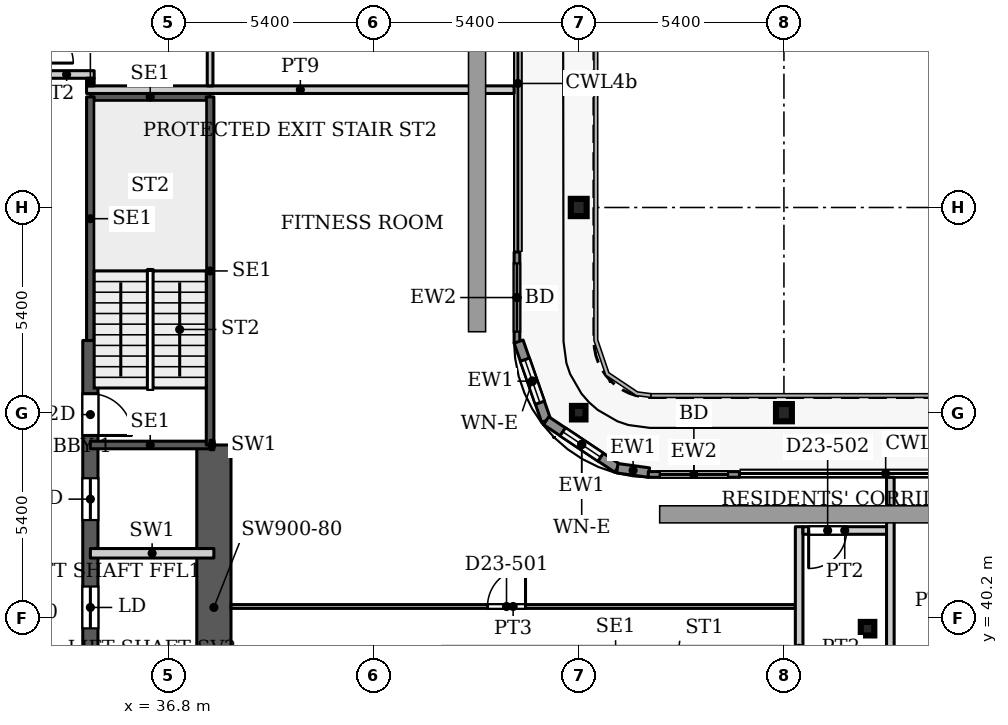
"""IFC4 building model, lengths in metres.
Left out: names, types, materials, properties, quantities, classifications, styles, units other than length and angle.
Written with IfcOpenShell. Run it as: python <this file> out.ifc"""

import sys

from ifc_helpers import new_model, si_unit, direction, frame, frame_2d, origin, origin_2d, place, context, subcontext, project, spatial, rectangle, hollow_rectangle, i_section, extrude, source, transform, mapped, element, fill, save


model = new_model("IFC4")
c1 = context("Model", 3, precision=1e-05, world=origin(), true_north=direction((0.0, 1.0)))
c2 = subcontext(c1, "Body", "Model", "MODEL_VIEW")
j1 = project(units=[si_unit("LENGTHUNIT", "METRE"), si_unit("PLANEANGLEUNIT", "RADIAN")], contexts=[c1])
p1 = place(None, origin())
s1 = spatial("IfcSite", under=j1, at=p1, CompositionType="ELEMENT")
p2 = place(p1, origin())
s2 = spatial("IfcBuilding", under=s1, at=p2, CompositionType="ELEMENT")
p3 = place(p2, frame((0.0, 0.0, 105.8)))
s3 = spatial("IfcBuildingStorey", under=s2, at=p3, CompositionType="ELEMENT", Elevation=105.8)
for number, where, z_axis, x_axis in (
    (1, (53.0, 45.6, 0.0), (0.0, 0.0, 1.0), (1.0, 0.0, 0.0)),
    (2, (47.6, 51.0, 0.0), (0.0, 0.0, 1.0), (1.0, 0.0, 0.0)),
):
    element("IfcColumn", number, at=place(p3, frame(where, z_axis=z_axis, x_axis=x_axis)), inside=s3, PredefinedType="COLUMN", context=c2, shape_type="SweptSolid", body=[
        extrude(i_section(OverallWidth=0.418, OverallDepth=0.455, WebThickness=0.042, FlangeThickness=0.068, FilletRadius=0.014, at=origin_2d()), origin(), (0.0, 0.0, 1.0), 3.9),
    ])
for number, where, z_axis, x_axis in (
    (3, (55.2, 39.916, 0.0), (0.0, 0.0, 1.0), (1.0, 0.0, 0.0)),
    (4, (47.6, 45.6, 0.0), (0.0, 0.0, 1.0), (1.0, 0.0, 0.0)),
):
    element("IfcColumn", number, at=place(p3, frame(where, z_axis=z_axis, x_axis=x_axis)), inside=s3, PredefinedType="COLUMN", context=c2, shape_type="SweptSolid", body=[
        extrude(hollow_rectangle(XDim=0.356, YDim=0.356, WallThickness=0.016, InnerFilletRadius=0.016, OuterFilletRadius=0.032, at=origin_2d()), origin(), (0.0, 0.0, 1.0), 3.9),
    ])
p4 = place(p3, frame((34.75, 29.05, 0.0), z_axis=(0.0, 0.0, 1.0), x_axis=(0.0, 1.0, 0.0)))
e5 = element("IfcWall", 5, at=p4, inside=s3, PredefinedType="SHEAR", context=c2, shape_type="SweptSolid", body=[
    extrude(rectangle(XDim=18.45, YDim=0.4, at=frame_2d((9.225, 0.0))), origin(), (0.0, 0.0, 1.0), 3.9),
])
p5 = place(p4, frame((8.025, 0.0, 0.0)))
e6 = element("IfcOpeningElement", 6, at=p5, cuts=e5, PredefinedType="OPENING", context=c2, shape_type="SweptSolid", body=[
    extrude(rectangle(XDim=1.1, YDim=2.2, at=frame_2d((0.55, 1.1))), frame((0.0, 0.21, 0.0), z_axis=(0.0, -1.0, 0.0), x_axis=(1.0, 0.0, 0.0)), (0.0, 0.0, 1.0), 0.42),
])
p6 = place(p4, frame((10.875, 0.0, 0.0)))
e7 = element("IfcOpeningElement", 7, at=p6, cuts=e5, PredefinedType="OPENING", context=c2, shape_type="SweptSolid", body=[
    extrude(rectangle(XDim=1.1, YDim=2.2, at=frame_2d((0.55, 1.1))), frame((0.0, 0.21, 0.0), z_axis=(0.0, -1.0, 0.0), x_axis=(1.0, 0.0, 0.0)), (0.0, 0.0, 1.0), 0.42),
])
p7 = place(p4, frame((13.725, 0.0, 0.0)))
e8 = element("IfcOpeningElement", 8, at=p7, cuts=e5, PredefinedType="OPENING", context=c2, shape_type="SweptSolid", body=[
    extrude(rectangle(XDim=1.1, YDim=2.2, at=frame_2d((0.55, 1.1))), frame((0.0, 0.21, 0.0), z_axis=(0.0, -1.0, 0.0), x_axis=(1.0, 0.0, 0.0)), (0.0, 0.0, 1.0), 0.42),
])
p8 = place(p4, frame((15.95, 0.0, 0.0)))
e9 = element("IfcOpeningElement", 9, at=p8, cuts=e5, PredefinedType="OPENING", context=c2, shape_type="SweptSolid", body=[
    extrude(rectangle(XDim=1.1, YDim=2.2, at=frame_2d((0.55, 1.1))), frame((0.0, 0.21, 0.0), z_axis=(0.0, -1.0, 0.0), x_axis=(1.0, 0.0, 0.0)), (0.0, 0.0, 1.0), 0.42),
])
p9 = place(p3, frame((38.0, 36.2, 0.0), z_axis=(0.0, 0.0, 1.0), x_axis=(0.0, 1.0, 0.0)))
e10 = element("IfcWall", 10, at=p9, inside=s3, PredefinedType="SHEAR", context=c2, shape_type="SweptSolid", body=[
    extrude(rectangle(XDim=8.55, YDim=0.9, at=frame_2d((4.275, 0.0))), origin(), (0.0, 0.0, 1.0), 3.9),
])
p10 = place(p3, frame((45.975, 49.83, 0.0), z_axis=(0.0, 0.0, 1.0), x_axis=(0.0, -1.0, 0.0)))
e11 = element("IfcWall", 11, at=p10, inside=s3, PredefinedType="SOLIDWALL", context=c2, shape_type="SweptSolid", body=[
    extrude(rectangle(XDim=2.4, YDim=0.15, at=frame_2d((1.2, 0.0))), origin(), (0.0, 0.0, 1.0), 3.75),
])
p11 = place(p10, frame((0.3, 0.0, 0.0)))
e12 = element("IfcOpeningElement", 12, at=p11, cuts=e11, PredefinedType="OPENING", context=c2, shape_type="SweptSolid", body=[
    extrude(rectangle(XDim=1.8, YDim=2.4, at=frame_2d((0.9, 1.2))), frame((0.0, 0.085, 0.0), z_axis=(0.0, -1.0, 0.0), x_axis=(1.0, 0.0, 0.0)), (0.0, 0.0, 1.0), 0.17),
])
p12 = place(p3, frame((46.018, 47.471, 0.0), z_axis=(0.0, 0.0, 1.0), x_axis=(0.328791208903, -0.944402637093, 0.0)))
e13 = element("IfcWall", 13, at=p12, inside=s3, PredefinedType="SOLIDWALL", context=c2, shape_type="SweptSolid", body=[
    extrude(rectangle(XDim=2.205, YDim=0.25, at=frame_2d((1.102, 0.0))), origin(), (0.0, 0.0, 1.0), 3.75),
])
p13 = place(p12, frame((0.503, 0.0, 0.6)))
e14 = element("IfcOpeningElement", 14, at=p13, cuts=e13, PredefinedType="OPENING", context=c2, shape_type="SweptSolid", body=[
    extrude(rectangle(XDim=1.2, YDim=2.1, at=frame_2d((0.6, 1.05))), frame((0.0, 0.135, 0.0), z_axis=(0.0, -1.0, 0.0), x_axis=(1.0, 0.0, 0.0)), (0.0, 0.0, 1.0), 0.27),
])
p14 = place(p3, frame((46.743, 45.389, 0.0), z_axis=(0.0, 0.0, 1.0), x_axis=(0.831449265529, -0.555600682912, 0.0)))
e15 = element("IfcWall", 15, at=p14, inside=s3, PredefinedType="SOLIDWALL", context=c2, shape_type="SweptSolid", body=[
    extrude(rectangle(XDim=2.251, YDim=0.25, at=frame_2d((1.126, 0.0))), origin(), (0.0, 0.0, 1.0), 3.75),
])
p15 = place(p14, frame((0.525, 0.0, 0.6)))
e16 = element("IfcOpeningElement", 16, at=p15, cuts=e15, PredefinedType="OPENING", context=c2, shape_type="SweptSolid", body=[
    extrude(rectangle(XDim=1.2, YDim=2.1, at=frame_2d((0.6, 1.05))), frame((0.0, 0.135, 0.0), z_axis=(0.0, -1.0, 0.0), x_axis=(1.0, 0.0, 0.0)), (0.0, 0.0, 1.0), 0.27),
])
p16 = place(p3, frame((48.615, 44.138, 0.0), z_axis=(0.0, 0.0, 1.0), x_axis=(0.990741504246, -0.135761819977, 0.0)))
e17 = element("IfcWall", 17, at=p16, inside=s3, PredefinedType="SOLIDWALL", context=c2, shape_type="SweptSolid", body=[
    extrude(rectangle(XDim=0.84, YDim=0.25, at=frame_2d((0.42, 0.0))), origin(), (0.0, 0.0, 1.0), 3.75),
])
p17 = place(p3, frame((49.43, 43.975, 0.0), z_axis=(0.0, 0.0, 1.0), x_axis=(1.0, 0.0, 0.0)))
e18 = element("IfcWall", 18, at=p17, inside=s3, PredefinedType="SOLIDWALL", context=c2, shape_type="SweptSolid", body=[
    extrude(rectangle(XDim=2.4, YDim=0.15, at=frame_2d((1.2, 0.0))), origin(), (0.0, 0.0, 1.0), 3.75),
])
p18 = place(p17, frame((0.3, 0.0, 0.0)))
e19 = element("IfcOpeningElement", 19, at=p18, cuts=e18, PredefinedType="OPENING", context=c2, shape_type="SweptSolid", body=[
    extrude(rectangle(XDim=1.8, YDim=2.4, at=frame_2d((0.9, 1.2))), frame((0.0, 0.085, 0.0), z_axis=(0.0, -1.0, 0.0), x_axis=(1.0, 0.0, 0.0)), (0.0, 0.0, 1.0), 0.17),
])
for number, where, z_axis, x_axis in (
    (20, (34.75, 44.75, 0.0), (0.0, 0.0, 1.0), (1.0, 0.0, 0.0)),
    (21, (34.75, 53.91, 0.0), (0.0, 0.0, 1.0), (1.0, 0.0, 0.0)),
):
    element("IfcWall", number, at=place(p3, frame(where, z_axis=z_axis, x_axis=x_axis)), inside=s3, PredefinedType="SHEAR", context=c2, shape_type="SweptSolid", body=[
        extrude(rectangle(XDim=3.15, YDim=0.2, at=frame_2d((1.575, 0.0))), origin(), (0.0, 0.0, 1.0), 3.9),
    ])
p19 = place(p3, frame((34.75, 47.5, 0.0), z_axis=(0.0, 0.0, 1.0), x_axis=(0.0, 1.0, 0.0)))
e22 = element("IfcWall", 22, at=p19, inside=s3, PredefinedType="SHEAR", context=c2, shape_type="SweptSolid", body=[
    extrude(rectangle(XDim=6.41, YDim=0.2, at=frame_2d((3.205, 0.0))), origin(), (0.0, 0.0, 1.0), 3.9),
])
p20 = place(p3, frame((37.9, 44.75, 0.0), z_axis=(0.0, 0.0, 1.0), x_axis=(0.0, 1.0, 0.0)))
e23 = element("IfcWall", 23, at=p20, inside=s3, PredefinedType="SHEAR", context=c2, shape_type="SweptSolid", body=[
    extrude(rectangle(XDim=9.16, YDim=0.2, at=frame_2d((4.58, 0.0))), origin(), (0.0, 0.0, 1.0), 3.9),
])
p21 = place(p3, frame((34.75, 41.9, 0.0), z_axis=(0.0, 0.0, 1.0), x_axis=(1.0, 0.0, 0.0)))
e24 = element("IfcWall", 24, at=p21, inside=s3, PredefinedType="PARTITIONING", context=c2, shape_type="SweptSolid", body=[
    extrude(rectangle(XDim=3.25, YDim=0.25, at=frame_2d((1.625, 0.0))), origin(), (0.0, 0.0, 1.0), 3.9),
])
p22 = place(p3, frame((37.9, 44.75, 0.0), z_axis=(0.0, 0.0, 1.0), x_axis=(1.0, 0.0, 0.0)))
e25 = element("IfcWall", 25, at=p22, inside=s3, PredefinedType="PARTITIONING", context=c2, shape_type="SweptSolid", body=[
    extrude(rectangle(XDim=0.1, YDim=0.25, at=frame_2d((0.05, 0.0))), origin(), (0.0, 0.0, 1.0), 3.9),
])
p23 = place(p3, frame((33.4, 54.5, 0.0), z_axis=(0.0, 0.0, 1.0), x_axis=(1.0, 0.0, 0.0)))
e26 = element("IfcWall", 26, at=p23, inside=s3, PredefinedType="PARTITIONING", context=c2, shape_type="SweptSolid", body=[
    extrude(rectangle(XDim=1.45, YDim=0.2, at=frame_2d((0.725, 0.0))), origin(), (0.0, 0.0, 1.0), 3.6),
])
p24 = place(p3, frame((34.65, 54.1, 0.0), z_axis=(0.0, 0.0, 1.0), x_axis=(1.0, 0.0, 0.0)))
e27 = element("IfcWall", 27, at=p24, inside=s3, PredefinedType="PARTITIONING", context=c2, shape_type="SweptSolid", body=[
    extrude(rectangle(XDim=11.25, YDim=0.2, at=frame_2d((5.625, 0.0))), origin(), (0.0, 0.0, 1.0), 3.6),
])
p25 = place(p3, frame((34.75, 54.2, 0.0), z_axis=(0.0, 0.0, 1.0), x_axis=(0.0, 1.0, 0.0)))
e28 = element("IfcWall", 28, at=p25, inside=s3, PredefinedType="PARTITIONING", context=c2, shape_type="SweptSolid", body=[
    extrude(rectangle(XDim=0.2, YDim=0.2, at=frame_2d((0.1, 0.0))), origin(), (0.0, 0.0, 1.0), 3.6),
])
p26 = place(p3, frame((37.9, 54.2, 0.0), z_axis=(0.0, 0.0, 1.0), x_axis=(0.0, 1.0, 0.0)))
e29 = element("IfcWall", 29, at=p26, inside=s3, PredefinedType="PARTITIONING", context=c2, shape_type="SweptSolid", body=[
    extrude(rectangle(XDim=13.3, YDim=0.15, at=frame_2d((6.65, 0.0))), origin(), (0.0, 0.0, 1.0), 3.6),
])
p27 = place(p26, frame((6.2, 0.0, 0.0)))
e30 = element("IfcOpeningElement", 30, at=p27, cuts=e29, PredefinedType="OPENING", context=c2, shape_type="SweptSolid", body=[
    extrude(rectangle(XDim=0.9, YDim=2.1, at=frame_2d((0.45, 1.05))), frame((0.0, 0.085, 0.0), z_axis=(0.0, -1.0, 0.0), x_axis=(1.0, 0.0, 0.0)), (0.0, 0.0, 1.0), 0.17),
])
p28 = place(p26, frame((1.95, 0.0, 0.0)))
e31 = element("IfcOpeningElement", 31, at=p28, cuts=e29, PredefinedType="OPENING", context=c2, shape_type="SweptSolid", body=[
    extrude(rectangle(XDim=1.0, YDim=2.1, at=frame_2d((0.5, 1.05))), frame((0.0, 0.085, 0.0), z_axis=(0.0, -1.0, 0.0), x_axis=(1.0, 0.0, 0.0)), (0.0, 0.0, 1.0), 0.17),
])
p29 = place(p26, frame((9.35, 0.0, 0.0)))
e32 = element("IfcOpeningElement", 32, at=p29, cuts=e29, PredefinedType="OPENING", context=c2, shape_type="SweptSolid", body=[
    extrude(rectangle(XDim=0.9, YDim=2.1, at=frame_2d((0.45, 1.05))), frame((0.0, 0.085, 0.0), z_axis=(0.0, -1.0, 0.0), x_axis=(1.0, 0.0, 0.0)), (0.0, 0.0, 1.0), 0.17),
])
p30 = place(p3, frame((38.449, 40.5, 0.0), z_axis=(0.0, 0.0, 1.0), x_axis=(1.0, 0.0, 0.0)))
e33 = element("IfcWall", 33, at=p30, inside=s3, PredefinedType="PARTITIONING", context=c2, shape_type="SweptSolid", body=[
    extrude(rectangle(XDim=14.851, YDim=0.1, at=frame_2d((7.426, 0.0))), origin(), (0.0, 0.0, 1.0), 3.6),
])
p31 = place(p30, frame((6.751, 0.0, 0.0)))
e34 = element("IfcOpeningElement", 34, at=p31, cuts=e33, PredefinedType="OPENING", context=c2, shape_type="SweptSolid", body=[
    extrude(rectangle(XDim=1.0, YDim=2.1, at=frame_2d((0.5, 1.05))), frame((0.0, 0.06, 0.0), z_axis=(0.0, -1.0, 0.0), x_axis=(1.0, 0.0, 0.0)), (0.0, 0.0, 1.0), 0.12),
])
p32 = place(p3, frame((53.4, 36.199, 0.0), z_axis=(0.0, 0.0, 1.0), x_axis=(0.0, 1.0, 0.0)))
e35 = element("IfcWall", 35, at=p32, inside=s3, PredefinedType="PARTITIONING", context=c2, shape_type="SweptSolid", body=[
    extrude(rectangle(XDim=6.401, YDim=0.2, at=frame_2d((3.201, 0.0))), origin(), (0.0, 0.0, 1.0), 3.6),
])
p33 = place(p3, frame((53.5, 42.5, 0.0), z_axis=(0.0, 0.0, 1.0), x_axis=(1.0, 0.0, 0.0)))
e36 = element("IfcWall", 36, at=p33, inside=s3, PredefinedType="PARTITIONING", context=c2, shape_type="SweptSolid", body=[
    extrude(rectangle(XDim=2.2, YDim=0.2, at=frame_2d((1.1, 0.0))), origin(), (0.0, 0.0, 1.0), 3.6),
])
p34 = place(p33, frame((0.15, 0.0, 0.0)))
e37 = element("IfcOpeningElement", 37, at=p34, cuts=e36, PredefinedType="OPENING", context=c2, shape_type="SweptSolid", body=[
    extrude(rectangle(XDim=1.0, YDim=2.1, at=frame_2d((0.5, 1.05))), frame((0.0, 0.11, 0.0), z_axis=(0.0, -1.0, 0.0), x_axis=(1.0, 0.0, 0.0)), (0.0, 0.0, 1.0), 0.22),
])
p35 = place(p3, frame((55.8, 30.4, 0.0), z_axis=(0.0, 0.0, 1.0), x_axis=(0.0, 1.0, 0.0)))
e38 = element("IfcWall", 38, at=p35, inside=s3, PredefinedType="PARTITIONING", context=c2, shape_type="SweptSolid", body=[
    extrude(rectangle(XDim=13.5, YDim=0.2, at=frame_2d((6.75, 0.0))), origin(), (0.0, 0.0, 1.0), 3.6),
])
m1 = source(origin(), c2, "Body", "SweptSolid", [
    extrude(rectangle(XDim=1.8, YDim=2.4, at=frame_2d((0.9, 1.2))), frame((0.0, 0.025, 0.0), z_axis=(0.0, -1.0, 0.0), x_axis=(1.0, 0.0, 0.0)), (0.0, 0.0, 1.0), 0.05),
])
p36 = place(p11, origin())
e39 = element("IfcDoor", 39, at=p36, inside=s3, OperationType="SLIDING_TO_LEFT", PredefinedType="DOOR", context=c2, shape_type="MappedRepresentation", body=[
    mapped(m1, transform((0.0, 0.0, 0.0), x_axis=(1.0, 0.0, 0.0), y_axis=(0.0, 1.0, 0.0), z_axis=(0.0, 0.0, 1.0), scale=1.0)),
])
fill(e12, e39)
m2 = source(origin(), c2, "Body", "SweptSolid", [
    extrude(rectangle(XDim=1.2, YDim=2.1, at=frame_2d((0.6, 1.05))), frame((0.0, 0.03, 0.0), z_axis=(0.0, -1.0, 0.0), x_axis=(1.0, 0.0, 0.0)), (0.0, 0.0, 1.0), 0.06),
])
p37 = place(p13, origin())
e40 = element("IfcWindow", 40, at=p37, inside=s3, PartitioningType="SINGLE_PANEL", PredefinedType="WINDOW", context=c2, shape_type="MappedRepresentation", body=[
    mapped(m2, transform((0.0, 0.0, 0.0), x_axis=(1.0, 0.0, 0.0), y_axis=(0.0, 1.0, 0.0), z_axis=(0.0, 0.0, 1.0), scale=1.0)),
])
fill(e14, e40)
p38 = place(p15, origin())
e41 = element("IfcWindow", 41, at=p38, inside=s3, PartitioningType="SINGLE_PANEL", PredefinedType="WINDOW", context=c2, shape_type="MappedRepresentation", body=[
    mapped(m2, transform((0.0, 0.0, 0.0), x_axis=(1.0, 0.0, 0.0), y_axis=(0.0, 1.0, 0.0), z_axis=(0.0, 0.0, 1.0), scale=1.0)),
])
fill(e16, e41)
p39 = place(p18, origin())
e42 = element("IfcDoor", 42, at=p39, inside=s3, OperationType="SLIDING_TO_LEFT", PredefinedType="DOOR", context=c2, shape_type="MappedRepresentation", body=[
    mapped(m1, transform((0.0, 0.0, 0.0), x_axis=(1.0, 0.0, 0.0), y_axis=(0.0, 1.0, 0.0), z_axis=(0.0, 0.0, 1.0), scale=1.0)),
])
fill(e19, e42)
m3 = source(origin(), c2, "Body", "SweptSolid", [
    extrude(rectangle(XDim=1.1, YDim=2.2, at=frame_2d((0.55, 1.1))), frame((0.0, 0.025, 0.0), z_axis=(0.0, -1.0, 0.0), x_axis=(1.0, 0.0, 0.0)), (0.0, 0.0, 1.0), 0.05),
])
p40 = place(p6, origin())
e43 = element("IfcDoor", 43, at=p40, inside=s3, OperationType="SLIDING_TO_LEFT", PredefinedType="DOOR", context=c2, shape_type="MappedRepresentation", body=[
    mapped(m3, transform((0.0, 0.0, 0.0), x_axis=(1.0, 0.0, 0.0), y_axis=(0.0, 1.0, 0.0), z_axis=(0.0, 0.0, 1.0), scale=1.0)),
])
fill(e7, e43)
p41 = place(p7, origin())
e44 = element("IfcDoor", 44, at=p41, inside=s3, OperationType="SLIDING_TO_LEFT", PredefinedType="DOOR", context=c2, shape_type="MappedRepresentation", body=[
    mapped(m3, transform((0.0, 0.0, 0.0), x_axis=(1.0, 0.0, 0.0), y_axis=(0.0, 1.0, 0.0), z_axis=(0.0, 0.0, 1.0), scale=1.0)),
])
fill(e8, e44)
m4 = source(origin(), c2, "Body", "SweptSolid", [
    extrude(rectangle(XDim=1.1, YDim=2.2, at=frame_2d((0.55, 1.1))), frame((0.0, 0.025, 0.0), z_axis=(0.0, -1.0, 0.0), x_axis=(1.0, 0.0, 0.0)), (0.0, 0.0, 1.0), 0.05),
])
p42 = place(p8, origin())
e45 = element("IfcDoor", 45, at=p42, inside=s3, OperationType="SINGLE_SWING_RIGHT", PredefinedType="DOOR", context=c2, shape_type="MappedRepresentation", body=[
    mapped(m4, transform((0.0, 0.0, 0.0), x_axis=(1.0, 0.0, 0.0), y_axis=(0.0, 1.0, 0.0), z_axis=(0.0, 0.0, 1.0), scale=1.0)),
])
fill(e9, e45)
m5 = source(origin(), c2, "Body", "SweptSolid", [
    extrude(rectangle(XDim=1.0, YDim=2.1, at=frame_2d((0.5, 1.05))), frame((0.0, 0.025, 0.0), z_axis=(0.0, -1.0, 0.0), x_axis=(1.0, 0.0, 0.0)), (0.0, 0.0, 1.0), 0.05),
])
p43 = place(p31, origin())
e46 = element("IfcDoor", 46, at=p43, inside=s3, OperationType="SINGLE_SWING_LEFT", PredefinedType="DOOR", context=c2, shape_type="MappedRepresentation", body=[
    mapped(m5, transform((0.0, 0.0, 0.0), x_axis=(1.0, 0.0, 0.0), y_axis=(0.0, 1.0, 0.0), z_axis=(0.0, 0.0, 1.0), scale=1.0)),
])
fill(e34, e46)
m6 = source(origin(), c2, "Body", "SweptSolid", [
    extrude(rectangle(XDim=1.0, YDim=2.1, at=frame_2d((0.5, 1.05))), frame((0.0, 0.025, 0.0), z_axis=(0.0, -1.0, 0.0), x_axis=(1.0, 0.0, 0.0)), (0.0, 0.0, 1.0), 0.05),
])
p44 = place(p34, origin())
e47 = element("IfcDoor", 47, at=p44, inside=s3, OperationType="SINGLE_SWING_RIGHT", PredefinedType="DOOR", context=c2, shape_type="MappedRepresentation", body=[
    mapped(m6, transform((0.0, 0.0, 0.0), x_axis=(1.0, 0.0, 0.0), y_axis=(0.0, 1.0, 0.0), z_axis=(0.0, 0.0, 1.0), scale=1.0)),
])
fill(e37, e47)
save(model, sys.argv[1])
